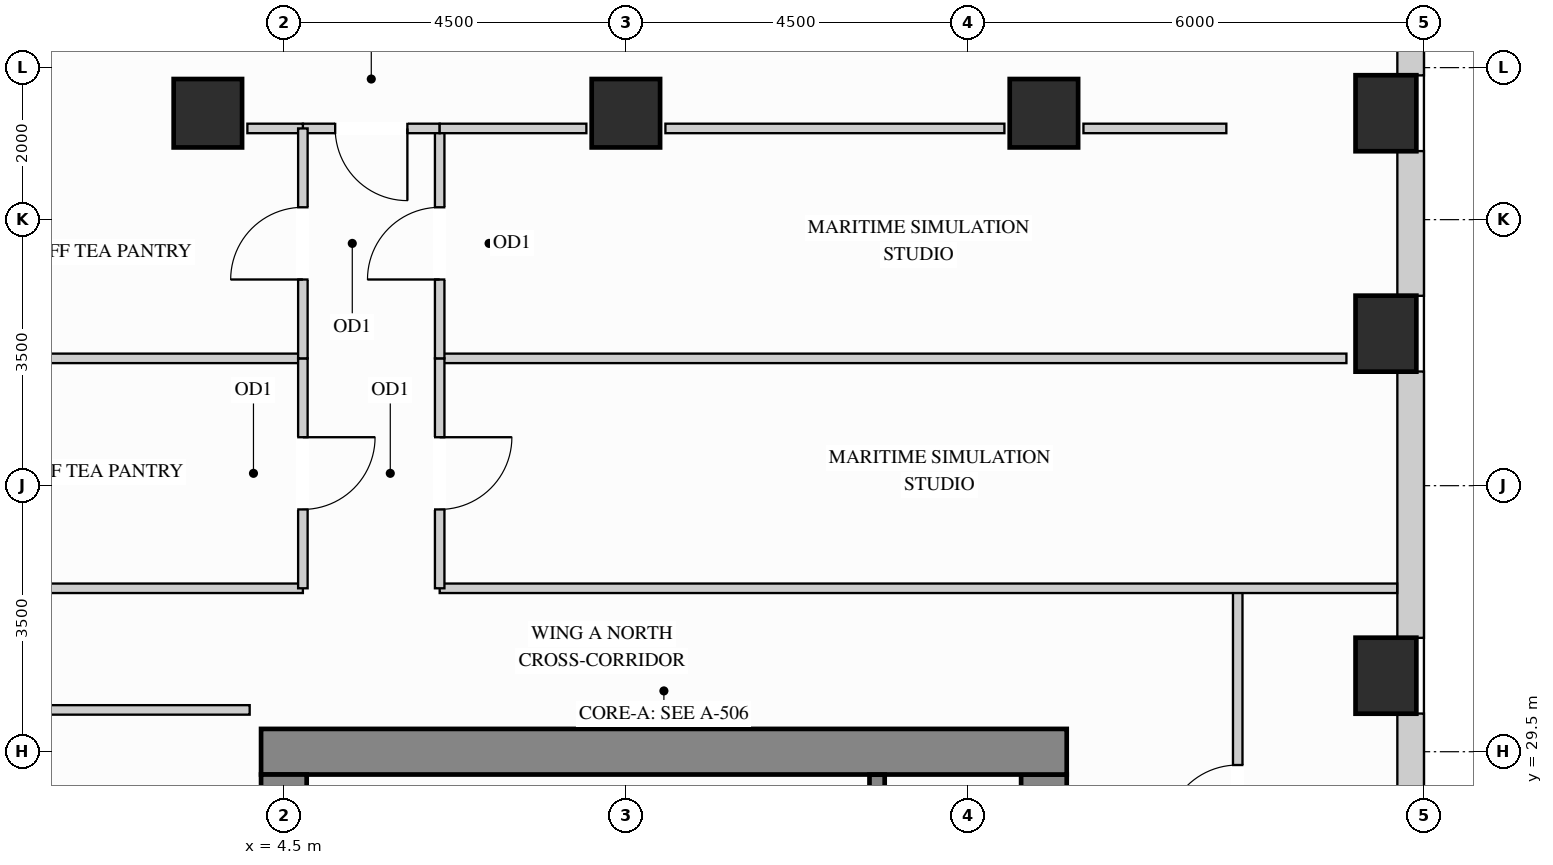
"""IFC4 building model, lengths in metres.
Left out: names, types, materials, properties, quantities, classifications, styles, units other than length and angle.
Written with IfcOpenShell. Run it as: python <this file> out.ifc"""

import sys

from ifc_helpers import new_model, si_unit, direction, frame, frame_2d, origin, origin_2d, place, context, subcontext, project, spatial, rectangle, extrude, source, transform, mapped, element, fill, save


model = new_model("IFC4")
c1 = context("Model", 3, precision=1e-05, world=origin(), true_north=direction((0.0, 1.0)))
c2 = subcontext(c1, "Body", "Model", "MODEL_VIEW")
j1 = project(units=[si_unit("LENGTHUNIT", "METRE"), si_unit("PLANEANGLEUNIT", "RADIAN")], contexts=[c1])
p1 = place(None, origin())
s1 = spatial("IfcSite", under=j1, at=p1, CompositionType="ELEMENT")
p2 = place(p1, origin())
s2 = spatial("IfcBuilding", under=s1, at=p2, CompositionType="ELEMENT")
p3 = place(p2, frame((0.0, 0.0, 193.5)))
s3 = spatial("IfcBuildingStorey", under=s2, at=p3, CompositionType="ELEMENT", Elevation=193.5)
m1 = source(origin(), c2, "Body", "SweptSolid", [
    extrude(rectangle(XDim=0.9, YDim=0.9, at=origin_2d()), origin(), (0.0, 0.0, 1.0), 3.4),
])
for number, where, z_axis, x_axis in (
    (1, (14.5, 37.9, 0.0), (0.0, 0.0, 1.0), (1.0, 0.0, 0.0)),
    (2, (3.5, 37.9, 0.0), (0.0, 0.0, 1.0), (1.0, 0.0, 0.0)),
    (3, (9.0, 37.9, 0.0), (0.0, 0.0, 1.0), (1.0, 0.0, 0.0)),
):
    element("IfcColumn", number, at=place(p3, frame(where, z_axis=z_axis, x_axis=x_axis)), inside=s3, PredefinedType="COLUMN", context=c2, shape_type="MappedRepresentation", body=[
        mapped(m1, transform((0.0, 0.0, 0.0), x_axis=(1.0, 0.0, 0.0), y_axis=(0.0, 1.0, 0.0), z_axis=(0.0, 0.0, 1.0))),
    ])
m2 = source(origin(), c2, "Body", "SweptSolid", [
    extrude(rectangle(XDim=0.8, YDim=1.0, at=origin_2d()), origin(), (0.0, 0.0, 1.0), 3.4),
])
for number, where, z_axis, x_axis in (
    (4, (19.0, 30.5, 0.0), (0.0, 0.0, 1.0), (1.0, 0.0, 0.0)),
    (5, (19.0, 35.0, 0.0), (0.0, 0.0, 1.0), (1.0, 0.0, 0.0)),
    (6, (19.0, 37.9, 0.0), (0.0, 0.0, 1.0), (1.0, 0.0, 0.0)),
):
    element("IfcColumn", number, at=place(p3, frame(where, z_axis=z_axis, x_axis=x_axis)), inside=s3, PredefinedType="COLUMN", context=c2, shape_type="MappedRepresentation", body=[
        mapped(m2, transform((0.0, 0.0, 0.0), x_axis=(1.0, 0.0, 0.0), y_axis=(0.0, 1.0, 0.0), z_axis=(0.0, 0.0, 1.0))),
    ])
m3 = source(origin(), c2, "Body", "SweptSolid", [
    extrude(rectangle(XDim=8.32, YDim=0.6, at=frame_2d((4.16, 0.0))), origin(), (0.0, 0.0, 1.0), 3.4),
])
p4 = place(p3, frame((14.5, 20.88, 0.0), z_axis=(0.0, 0.0, 1.0), x_axis=(0.0, 1.0, 0.0)))
e7 = element("IfcWall", 7, at=p4, inside=s3, PredefinedType="SHEAR", context=c2, shape_type="MappedRepresentation", body=[
    mapped(m3, transform((0.0, 0.0, 0.0), x_axis=(1.0, 0.0, 0.0), y_axis=(0.0, 1.0, 0.0), z_axis=(0.0, 0.0, 1.0))),
])
m4 = source(origin(), c2, "Body", "SweptSolid", [
    extrude(rectangle(XDim=10.6, YDim=0.6, at=frame_2d((5.3, 0.0))), origin(), (0.0, 0.0, 1.0), 3.4),
])
p5 = place(p3, frame((4.2, 29.5, 0.0), z_axis=(0.0, 0.0, 1.0), x_axis=(1.0, 0.0, 0.0)))
e8 = element("IfcWall", 8, at=p5, inside=s3, PredefinedType="SHEAR", context=c2, shape_type="MappedRepresentation", body=[
    mapped(m4, transform((0.0, 0.0, 0.0), x_axis=(1.0, 0.0, 0.0), y_axis=(0.0, 1.0, 0.0), z_axis=(0.0, 0.0, 1.0))),
])
m5 = source(origin(), c2, "Body", "SweptSolid", [
    extrude(rectangle(XDim=20.4, YDim=0.6, at=frame_2d((10.2, 0.0))), origin(), (0.0, 0.0, 1.0), 3.4),
])
p6 = place(p3, frame((4.5, 8.8, 0.0), z_axis=(0.0, 0.0, 1.0), x_axis=(0.0, 1.0, 0.0)))
e9 = element("IfcWall", 9, at=p6, inside=s3, PredefinedType="SHEAR", context=c2, shape_type="MappedRepresentation", body=[
    mapped(m5, transform((0.0, 0.0, 0.0), x_axis=(1.0, 0.0, 0.0), y_axis=(0.0, 1.0, 0.0), z_axis=(0.0, 0.0, 1.0))),
])
p7 = place(p3, frame((19.325, 27.298, 0.0), z_axis=(0.0, 0.0, 1.0), x_axis=(0.0, 1.0, 0.0)))
e10 = element("IfcWall", 10, at=p7, inside=s3, PredefinedType="SOLIDWALL", context=c2, shape_type="SweptSolid", body=[
    extrude(rectangle(XDim=2.704, YDim=0.35, at=frame_2d((1.352, 0.0))), origin(), (0.0, 0.0, 1.0), 2.612),
])
p8 = place(p7, frame((0.524, 0.0, 0.78)))
e11 = element("IfcOpeningElement", 11, at=p8, cuts=e10, PredefinedType="OPENING", context=c2, shape_type="SweptSolid", body=[
    extrude(rectangle(XDim=1.2, YDim=1.652, at=frame_2d((0.6, 0.826))), frame((0.0, 0.185, 0.0), z_axis=(0.0, -1.0, 0.0), x_axis=(1.0, 0.0, 0.0)), (0.0, 0.0, 1.0), 0.37),
])
m6 = source(origin(), c2, "Body", "SweptSolid", [
    extrude(rectangle(XDim=3.504, YDim=0.35, at=frame_2d((1.752, 0.0))), origin(), (0.0, 0.0, 1.0), 2.612),
])
p9 = place(p3, frame((19.325, 30.998, 0.0), z_axis=(0.0, 0.0, 1.0), x_axis=(0.0, 1.0, 0.0)))
e12 = element("IfcWall", 12, at=p9, inside=s3, PredefinedType="SOLIDWALL", context=c2, shape_type="MappedRepresentation", body=[
    mapped(m6, transform((0.0, 0.0, 0.0), x_axis=(1.0, 0.0, 0.0), y_axis=(0.0, 1.0, 0.0), z_axis=(0.0, 0.0, 1.0))),
])
m7 = source(origin(), c2, "Body", "SweptSolid", [
    extrude(rectangle(XDim=1.904, YDim=0.35, at=frame_2d((0.952, 0.0))), origin(), (0.0, 0.0, 1.0), 2.612),
])
p10 = place(p3, frame((19.325, 35.498, 0.0), z_axis=(0.0, 0.0, 1.0), x_axis=(0.0, 1.0, 0.0)))
e13 = element("IfcWall", 13, at=p10, inside=s3, PredefinedType="SOLIDWALL", context=c2, shape_type="MappedRepresentation", body=[
    mapped(m7, transform((0.0, 0.0, 0.0), x_axis=(1.0, 0.0, 0.0), y_axis=(0.0, 1.0, 0.0), z_axis=(0.0, 0.0, 1.0))),
])
m8 = source(origin(), c2, "Body", "SweptSolid", [
    extrude(rectangle(XDim=0.754, YDim=0.35, at=frame_2d((0.377, 0.0))), origin(), (0.0, 0.0, 1.0), 3.385),
])
p11 = place(p3, frame((19.325, 38.398, 0.0), z_axis=(0.0, 0.0, 1.0), x_axis=(0.0, 1.0, 0.0)))
e14 = element("IfcWall", 14, at=p11, inside=s3, PredefinedType="SOLIDWALL", context=c2, shape_type="MappedRepresentation", body=[
    mapped(m8, transform((0.0, 0.0, 0.0), x_axis=(1.0, 0.0, 0.0), y_axis=(0.0, 1.0, 0.0), z_axis=(0.0, 0.0, 1.0))),
])
p12 = place(p3, frame((17.05, 26.05, 0.0), z_axis=(0.0, 0.0, 1.0), x_axis=(0.0, 1.0, 0.0)))
e15 = element("IfcWall", 15, at=p12, inside=s3, PredefinedType="PARTITIONING", context=c2, shape_type="SweptSolid", body=[
    extrude(rectangle(XDim=5.6, YDim=0.125, at=frame_2d((2.8, 0.0))), origin(), (0.0, 0.0, 1.0), 3.385),
])
p13 = place(p12, frame((2.325, 0.0, 0.0)))
e16 = element("IfcOpeningElement", 16, at=p13, cuts=e15, PredefinedType="OPENING", context=c2, shape_type="SweptSolid", body=[
    extrude(rectangle(XDim=0.95, YDim=2.15, at=frame_2d((0.475, 1.075))), frame((0.0, 0.073, 0.0), z_axis=(0.0, -1.0, 0.0), x_axis=(1.0, 0.0, 0.0)), (0.0, 0.0, 1.0), 0.145),
])
m9 = source(origin(), c2, "Body", "SweptSolid", [
    extrude(rectangle(XDim=11.93, YDim=0.125, at=frame_2d((5.965, 0.0))), origin(), (0.0, 0.0, 1.0), 3.385),
])
p14 = place(p3, frame((6.55, 34.675, 0.0), z_axis=(0.0, 0.0, 1.0), x_axis=(1.0, 0.0, 0.0)))
e17 = element("IfcWall", 17, at=p14, inside=s3, PredefinedType="PARTITIONING", context=c2, shape_type="MappedRepresentation", body=[
    mapped(m9, transform((0.0, 0.0, 0.0), x_axis=(1.0, 0.0, 0.0), y_axis=(0.0, 1.0, 0.0), z_axis=(0.0, 0.0, 1.0))),
])
m10 = source(origin(), c2, "Body", "SweptSolid", [
    extrude(rectangle(XDim=12.598, YDim=0.125, at=frame_2d((6.299, 0.0))), origin(), (0.0, 0.0, 1.0), 2.848),
])
p15 = place(p3, frame((6.55, 31.65, 0.0), z_axis=(0.0, 0.0, 1.0), x_axis=(1.0, 0.0, 0.0)))
e18 = element("IfcWall", 18, at=p15, inside=s3, PredefinedType="PARTITIONING", context=c2, shape_type="MappedRepresentation", body=[
    mapped(m10, transform((0.0, 0.0, 0.0), x_axis=(1.0, 0.0, 0.0), y_axis=(0.0, 1.0, 0.0), z_axis=(0.0, 0.0, 1.0))),
])
m11 = source(origin(), c2, "Body", "SweptSolid", [
    extrude(rectangle(XDim=4.398, YDim=0.125, at=frame_2d((2.199, 0.0))), origin(), (0.0, 0.0, 1.0), 2.848),
])
p16 = place(p3, frame((0.352, 31.65, 0.0), z_axis=(0.0, 0.0, 1.0), x_axis=(1.0, 0.0, 0.0)))
e19 = element("IfcWall", 19, at=p16, inside=s3, PredefinedType="PARTITIONING", context=c2, shape_type="MappedRepresentation", body=[
    mapped(m11, transform((0.0, 0.0, 0.0), x_axis=(1.0, 0.0, 0.0), y_axis=(0.0, 1.0, 0.0), z_axis=(0.0, 0.0, 1.0))),
])
m12 = source(origin(), c2, "Body", "SweptSolid", [
    extrude(rectangle(XDim=3.63, YDim=0.125, at=frame_2d((1.815, 0.0))), origin(), (0.0, 0.0, 1.0), 3.385),
])
p17 = place(p3, frame((1.12, 34.675, 0.0), z_axis=(0.0, 0.0, 1.0), x_axis=(1.0, 0.0, 0.0)))
e20 = element("IfcWall", 20, at=p17, inside=s3, PredefinedType="PARTITIONING", context=c2, shape_type="MappedRepresentation", body=[
    mapped(m12, transform((0.0, 0.0, 0.0), x_axis=(1.0, 0.0, 0.0), y_axis=(0.0, 1.0, 0.0), z_axis=(0.0, 0.0, 1.0))),
])
m13 = source(origin(), c2, "Body", "SweptSolid", [
    extrude(rectangle(XDim=2.93, YDim=0.125, at=frame_2d((1.465, 0.0))), origin(), (0.0, 0.0, 1.0), 3.385),
])
p18 = place(p3, frame((1.12, 30.05, 0.0), z_axis=(0.0, 0.0, 1.0), x_axis=(1.0, 0.0, 0.0)))
e21 = element("IfcWall", 21, at=p18, inside=s3, PredefinedType="PARTITIONING", context=c2, shape_type="MappedRepresentation", body=[
    mapped(m13, transform((0.0, 0.0, 0.0), x_axis=(1.0, 0.0, 0.0), y_axis=(0.0, 1.0, 0.0), z_axis=(0.0, 0.0, 1.0))),
])
p19 = place(p3, frame((6.55, 31.65, 0.0), z_axis=(0.0, 0.0, 1.0), x_axis=(0.0, 1.0, 0.0)))
e22 = element("IfcWall", 22, at=p19, inside=s3, PredefinedType="PARTITIONING", context=c2, shape_type="SweptSolid", body=[
    extrude(rectangle(XDim=3.025, YDim=0.125, at=frame_2d((1.513, 0.0))), origin(), (0.0, 0.0, 1.0), 3.385),
])
p20 = place(p19, frame((1.038, 0.0, 0.0)))
e23 = element("IfcOpeningElement", 23, at=p20, cuts=e22, PredefinedType="OPENING", context=c2, shape_type="SweptSolid", body=[
    extrude(rectangle(XDim=0.95, YDim=2.15, at=frame_2d((0.475, 1.075))), frame((0.0, 0.073, 0.0), z_axis=(0.0, -1.0, 0.0), x_axis=(1.0, 0.0, 0.0)), (0.0, 0.0, 1.0), 0.145),
])
p21 = place(p3, frame((6.55, 34.675, 0.0), z_axis=(0.0, 0.0, 1.0), x_axis=(0.0, 1.0, 0.0)))
e24 = element("IfcWall", 24, at=p21, inside=s3, PredefinedType="PARTITIONING", context=c2, shape_type="SweptSolid", body=[
    extrude(rectangle(XDim=3.025, YDim=0.125, at=frame_2d((1.512, 0.0))), origin(), (0.0, 0.0, 1.0), 3.385),
])
p22 = place(p21, frame((1.038, 0.0, 0.0)))
e25 = element("IfcOpeningElement", 25, at=p22, cuts=e24, PredefinedType="OPENING", context=c2, shape_type="SweptSolid", body=[
    extrude(rectangle(XDim=0.95, YDim=2.15, at=frame_2d((0.475, 1.075))), frame((0.0, 0.073, 0.0), z_axis=(0.0, -1.0, 0.0), x_axis=(1.0, 0.0, 0.0)), (0.0, 0.0, 1.0), 0.145),
])
p23 = place(p3, frame((4.75, 37.7, 0.0), z_axis=(0.0, 0.0, 1.0), x_axis=(1.0, 0.0, 0.0)))
e26 = element("IfcWall", 26, at=p23, inside=s3, PredefinedType="PARTITIONING", context=c2, shape_type="SweptSolid", body=[
    extrude(rectangle(XDim=1.8, YDim=0.125, at=frame_2d((0.9, 0.0))), origin(), (0.0, 0.0, 1.0), 2.773),
])
p24 = place(p23, frame((0.425, 0.0, 0.0)))
e27 = element("IfcOpeningElement", 27, at=p24, cuts=e26, PredefinedType="OPENING", context=c2, shape_type="SweptSolid", body=[
    extrude(rectangle(XDim=0.95, YDim=2.15, at=frame_2d((0.475, 1.075))), frame((0.0, 0.073, 0.0), z_axis=(0.0, -1.0, 0.0), x_axis=(1.0, 0.0, 0.0)), (0.0, 0.0, 1.0), 0.145),
])
m14 = source(origin(), c2, "Body", "SweptSolid", [
    extrude(rectangle(XDim=1.93, YDim=0.125, at=frame_2d((0.965, 0.0))), origin(), (0.0, 0.0, 1.0), 2.773),
])
p25 = place(p3, frame((6.55, 37.7, 0.0), z_axis=(0.0, 0.0, 1.0), x_axis=(1.0, 0.0, 0.0)))
e28 = element("IfcWall", 28, at=p25, inside=s3, PredefinedType="PARTITIONING", context=c2, shape_type="MappedRepresentation", body=[
    mapped(m14, transform((0.0, 0.0, 0.0), x_axis=(1.0, 0.0, 0.0), y_axis=(0.0, 1.0, 0.0), z_axis=(0.0, 0.0, 1.0))),
])
m15 = source(origin(), c2, "Body", "SweptSolid", [
    extrude(rectangle(XDim=4.46, YDim=0.125, at=frame_2d((2.23, 0.0))), origin(), (0.0, 0.0, 1.0), 2.773),
])
p26 = place(p3, frame((9.52, 37.7, 0.0), z_axis=(0.0, 0.0, 1.0), x_axis=(1.0, 0.0, 0.0)))
e29 = element("IfcWall", 29, at=p26, inside=s3, PredefinedType="PARTITIONING", context=c2, shape_type="MappedRepresentation", body=[
    mapped(m15, transform((0.0, 0.0, 0.0), x_axis=(1.0, 0.0, 0.0), y_axis=(0.0, 1.0, 0.0), z_axis=(0.0, 0.0, 1.0))),
])
m16 = source(origin(), c2, "Body", "SweptSolid", [
    extrude(rectangle(XDim=1.88, YDim=0.125, at=frame_2d((0.94, 0.0))), origin(), (0.0, 0.0, 1.0), 2.773),
])
p27 = place(p3, frame((15.02, 37.7, 0.0), z_axis=(0.0, 0.0, 1.0), x_axis=(1.0, 0.0, 0.0)))
e30 = element("IfcWall", 30, at=p27, inside=s3, PredefinedType="PARTITIONING", context=c2, shape_type="MappedRepresentation", body=[
    mapped(m16, transform((0.0, 0.0, 0.0), x_axis=(1.0, 0.0, 0.0), y_axis=(0.0, 1.0, 0.0), z_axis=(0.0, 0.0, 1.0))),
])
m17 = source(origin(), c2, "Body", "SweptSolid", [
    extrude(rectangle(XDim=0.73, YDim=0.125, at=frame_2d((0.365, 0.0))), origin(), (0.0, 0.0, 1.0), 2.773),
])
p28 = place(p3, frame((4.02, 37.7, 0.0), z_axis=(0.0, 0.0, 1.0), x_axis=(1.0, 0.0, 0.0)))
e31 = element("IfcWall", 31, at=p28, inside=s3, PredefinedType="PARTITIONING", context=c2, shape_type="MappedRepresentation", body=[
    mapped(m17, transform((0.0, 0.0, 0.0), x_axis=(1.0, 0.0, 0.0), y_axis=(0.0, 1.0, 0.0), z_axis=(0.0, 0.0, 1.0))),
])
p29 = place(p3, frame((4.75, 31.65, 0.0), z_axis=(0.0, 0.0, 1.0), x_axis=(0.0, 1.0, 0.0)))
e32 = element("IfcWall", 32, at=p29, inside=s3, PredefinedType="PARTITIONING", context=c2, shape_type="SweptSolid", body=[
    extrude(rectangle(XDim=3.025, YDim=0.125, at=frame_2d((1.513, 0.0))), origin(), (0.0, 0.0, 1.0), 3.385),
])
p30 = place(p29, frame((1.038, 0.0, 0.0)))
e33 = element("IfcOpeningElement", 33, at=p30, cuts=e32, PredefinedType="OPENING", context=c2, shape_type="SweptSolid", body=[
    extrude(rectangle(XDim=0.95, YDim=2.15, at=frame_2d((0.475, 1.075))), frame((0.0, 0.073, 0.0), z_axis=(0.0, -1.0, 0.0), x_axis=(1.0, 0.0, 0.0)), (0.0, 0.0, 1.0), 0.145),
])
p31 = place(p3, frame((4.75, 34.675, 0.0), z_axis=(0.0, 0.0, 1.0), x_axis=(0.0, 1.0, 0.0)))
e34 = element("IfcWall", 34, at=p31, inside=s3, PredefinedType="PARTITIONING", context=c2, shape_type="SweptSolid", body=[
    extrude(rectangle(XDim=3.025, YDim=0.125, at=frame_2d((1.512, 0.0))), origin(), (0.0, 0.0, 1.0), 3.385),
])
p32 = place(p31, frame((1.038, 0.0, 0.0)))
e35 = element("IfcOpeningElement", 35, at=p32, cuts=e34, PredefinedType="OPENING", context=c2, shape_type="SweptSolid", body=[
    extrude(rectangle(XDim=0.95, YDim=2.15, at=frame_2d((0.475, 1.075))), frame((0.0, 0.073, 0.0), z_axis=(0.0, -1.0, 0.0), x_axis=(1.0, 0.0, 0.0)), (0.0, 0.0, 1.0), 0.145),
])
m18 = source(origin(), c2, "Body", "SweptSolid", [
    extrude(rectangle(XDim=3.753, YDim=0.2, at=frame_2d((1.876, 0.0))), origin(), (0.0, 0.0, 1.0), 3.4),
])
p33 = place(p3, frame((12.305, 25.445, 0.0), z_axis=(0.0, 0.0, 1.0), x_axis=(0.0, 1.0, 0.0)))
e36 = element("IfcWall", 36, at=p33, inside=s3, PredefinedType="SHEAR", context=c2, shape_type="MappedRepresentation", body=[
    mapped(m18, transform((0.0, 0.0, 0.0), x_axis=(1.0, 0.0, 0.0), y_axis=(0.0, 1.0, 0.0), z_axis=(0.0, 0.0, 1.0))),
])
m19 = source(origin(), c2, "Body", "SweptSolid", [
    extrude(rectangle(XDim=0.95, YDim=2.15, at=frame_2d((0.475, 1.075))), frame((0.0, 0.025, 0.0), z_axis=(0.0, -1.0, 0.0), x_axis=(1.0, 0.0, 0.0)), (0.0, 0.0, 1.0), 0.05),
])
p34 = place(p13, origin())
e37 = element("IfcDoor", 37, at=p34, inside=s3, OperationType="SINGLE_SWING_LEFT", PredefinedType="DOOR", context=c2, shape_type="MappedRepresentation", body=[
    mapped(m19, transform((0.0, 0.0, 0.0), x_axis=(1.0, 0.0, 0.0), y_axis=(0.0, 1.0, 0.0), z_axis=(0.0, 0.0, 1.0))),
])
fill(e16, e37)
p35 = place(p20, origin())
e38 = element("IfcDoor", 38, at=p35, inside=s3, OperationType="SINGLE_SWING_RIGHT", PredefinedType="DOOR", context=c2, shape_type="MappedRepresentation", body=[
    mapped(m19, transform((0.0, 0.0, 0.0), x_axis=(1.0, 0.0, 0.0), y_axis=(0.0, 1.0, 0.0), z_axis=(0.0, 0.0, 1.0))),
])
fill(e23, e38)
p36 = place(p22, origin())
e39 = element("IfcDoor", 39, at=p36, inside=s3, OperationType="SINGLE_SWING_LEFT", PredefinedType="DOOR", context=c2, shape_type="MappedRepresentation", body=[
    mapped(m19, transform((0.0, 0.0, 0.0), x_axis=(1.0, 0.0, 0.0), y_axis=(0.0, 1.0, 0.0), z_axis=(0.0, 0.0, 1.0))),
])
fill(e25, e39)
p37 = place(p24, origin())
e40 = element("IfcDoor", 40, at=p37, inside=s3, OperationType="SINGLE_SWING_RIGHT", PredefinedType="DOOR", context=c2, shape_type="MappedRepresentation", body=[
    mapped(m19, transform((0.0, 0.0, 0.0), x_axis=(1.0, 0.0, 0.0), y_axis=(0.0, 1.0, 0.0), z_axis=(0.0, 0.0, 1.0))),
])
fill(e27, e40)
p38 = place(p30, origin())
e41 = element("IfcDoor", 41, at=p38, inside=s3, OperationType="SINGLE_SWING_RIGHT", PredefinedType="DOOR", context=c2, shape_type="MappedRepresentation", body=[
    mapped(m19, transform((0.0, 0.0, 0.0), x_axis=(1.0, 0.0, 0.0), y_axis=(0.0, 1.0, 0.0), z_axis=(0.0, 0.0, 1.0))),
])
fill(e33, e41)
p39 = place(p32, origin())
e42 = element("IfcDoor", 42, at=p39, inside=s3, OperationType="SINGLE_SWING_LEFT", PredefinedType="DOOR", context=c2, shape_type="MappedRepresentation", body=[
    mapped(m19, transform((0.0, 0.0, 0.0), x_axis=(1.0, 0.0, 0.0), y_axis=(0.0, 1.0, 0.0), z_axis=(0.0, 0.0, 1.0))),
])
fill(e35, e42)
save(model, sys.argv[1])
